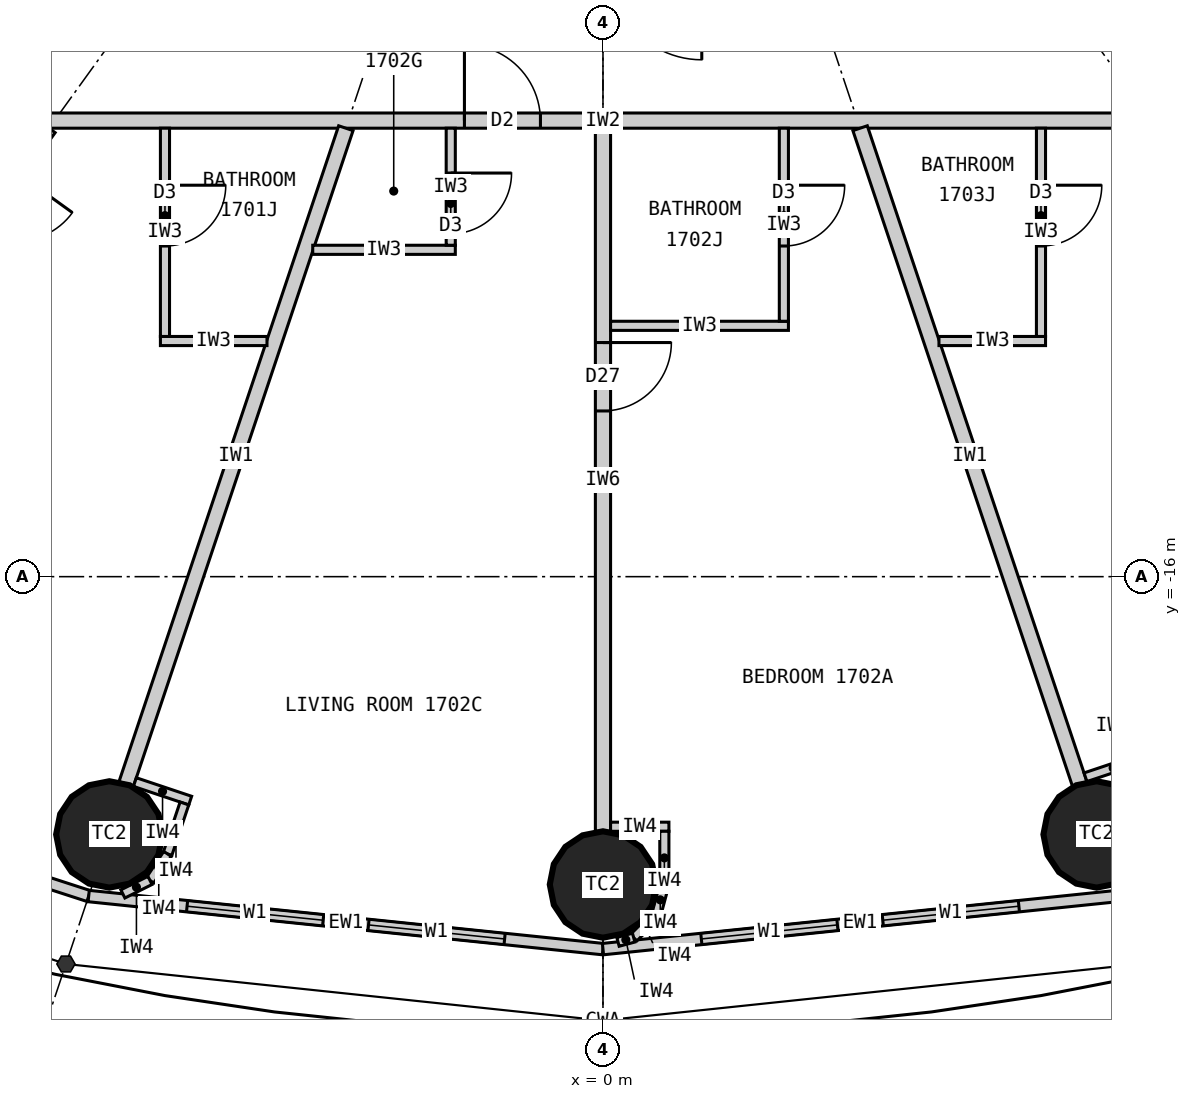
"""IFC4 building model, lengths in metres.
Left out: names, types, materials, properties, quantities, classifications, styles, units other than length and angle.
Written with IfcOpenShell. Run it as: python <this file> out.ifc"""

import sys

from ifc_helpers import new_model, si_unit, direction, frame, frame_2d, origin, origin_2d, place, context, subcontext, project, spatial, rectangle, circle, extrude, element, fill, save


model = new_model("IFC4")
c1 = context("Model", 3, precision=1e-05, world=origin(), true_north=direction((0.0, 1.0)))
c2 = subcontext(c1, "Body", "Model", "MODEL_VIEW")
j1 = project(units=[si_unit("LENGTHUNIT", "METRE"), si_unit("PLANEANGLEUNIT", "RADIAN")], contexts=[c1])
p1 = place(None, origin())
s1 = spatial("IfcSite", under=j1, at=p1, CompositionType="ELEMENT")
p2 = place(p1, origin())
s2 = spatial("IfcBuilding", under=s1, at=p2, CompositionType="ELEMENT")
p3 = place(p2, frame((0.0, 0.0, 70.5)))
s3 = spatial("IfcBuildingStorey", under=s2, at=p3, CompositionType="ELEMENT", Elevation=70.5)
for number, where, z_axis, x_axis in (
    (1, (-6.495, -19.391, 0.0), (0.0, 0.0, 1.0), (1.0, 0.0, 0.0)),
    (2, (0.0, -20.05, 0.0), (0.0, 0.0, 1.0), (1.0, 0.0, 0.0)),
    (3, (6.495, -19.391, 0.0), (0.0, 0.0, 1.0), (1.0, 0.0, 0.0)),
):
    element("IfcColumn", number, at=place(p3, frame(where, z_axis=z_axis, x_axis=x_axis)), inside=s3, PredefinedType="COLUMN", context=c2, shape_type="SweptSolid", body=[
        extrude(circle(Radius=0.7, at=origin_2d()), origin(), (0.0, 0.0, 1.0), 3.3),
    ])
p4 = place(p3, frame((-13.096, -18.147, 0.0), z_axis=(0.0, 0.0, 1.0), x_axis=(0.951137534625, -0.308767534285, 0.0)))
e4 = element("IfcWall", 4, at=p4, inside=s3, PredefinedType="ELEMENTEDWALL", context=c2, shape_type="SweptSolid", body=[
    extrude(rectangle(XDim=6.655, YDim=0.15, at=frame_2d((3.328, 0.0))), origin(), (0.0, 0.0, 1.0), 3.12),
])
p5 = place(p4, frame((1.228, 0.0, 0.9)))
e5 = element("IfcOpeningElement", 5, at=p5, cuts=e4, PredefinedType="OPENING", context=c2, shape_type="SweptSolid", body=[
    extrude(rectangle(XDim=1.8, YDim=1.9, at=frame_2d((0.9, 0.95))), frame((0.0, 0.085, 0.0), z_axis=(0.0, -1.0, 0.0), x_axis=(1.0, 0.0, 0.0)), (0.0, 0.0, 1.0), 0.17),
])
p6 = place(p4, frame((3.628, 0.0, 0.9)))
e6 = element("IfcOpeningElement", 6, at=p6, cuts=e4, PredefinedType="OPENING", context=c2, shape_type="SweptSolid", body=[
    extrude(rectangle(XDim=1.8, YDim=1.9, at=frame_2d((0.9, 0.95))), frame((0.0, 0.085, 0.0), z_axis=(0.0, -1.0, 0.0), x_axis=(1.0, 0.0, 0.0)), (0.0, 0.0, 1.0), 0.17),
])
p7 = place(p3, frame((-6.766, -20.202, 0.0), z_axis=(0.0, 0.0, 1.0), x_axis=(0.994721394369, -0.102612609291, 0.0)))
e7 = element("IfcWall", 7, at=p7, inside=s3, PredefinedType="ELEMENTEDWALL", context=c2, shape_type="SweptSolid", body=[
    extrude(rectangle(XDim=6.802, YDim=0.15, at=frame_2d((3.401, 0.0))), origin(), (0.0, 0.0, 1.0), 3.12),
])
p8 = place(p7, frame((1.301, 0.0, 0.9)))
e8 = element("IfcOpeningElement", 8, at=p8, cuts=e7, PredefinedType="OPENING", context=c2, shape_type="SweptSolid", body=[
    extrude(rectangle(XDim=1.8, YDim=1.9, at=frame_2d((0.9, 0.95))), frame((0.0, 0.085, 0.0), z_axis=(0.0, -1.0, 0.0), x_axis=(1.0, 0.0, 0.0)), (0.0, 0.0, 1.0), 0.17),
])
p9 = place(p7, frame((3.701, 0.0, 0.9)))
e9 = element("IfcOpeningElement", 9, at=p9, cuts=e7, PredefinedType="OPENING", context=c2, shape_type="SweptSolid", body=[
    extrude(rectangle(XDim=1.8, YDim=1.9, at=frame_2d((0.9, 0.95))), frame((0.0, 0.085, 0.0), z_axis=(0.0, -1.0, 0.0), x_axis=(1.0, 0.0, 0.0)), (0.0, 0.0, 1.0), 0.17),
])
p10 = place(p3, frame((0.0, -20.9, 0.0), z_axis=(0.0, 0.0, 1.0), x_axis=(0.994721394369, 0.102612609291, 0.0)))
e10 = element("IfcWall", 10, at=p10, inside=s3, PredefinedType="ELEMENTEDWALL", context=c2, shape_type="SweptSolid", body=[
    extrude(rectangle(XDim=6.802, YDim=0.15, at=frame_2d((3.401, 0.0))), origin(), (0.0, 0.0, 1.0), 3.12),
])
p11 = place(p10, frame((1.301, 0.0, 0.9)))
e11 = element("IfcOpeningElement", 11, at=p11, cuts=e10, PredefinedType="OPENING", context=c2, shape_type="SweptSolid", body=[
    extrude(rectangle(XDim=1.8, YDim=1.9, at=frame_2d((0.9, 0.95))), frame((0.0, 0.085, 0.0), z_axis=(0.0, -1.0, 0.0), x_axis=(1.0, 0.0, 0.0)), (0.0, 0.0, 1.0), 0.17),
])
p12 = place(p10, frame((3.701, 0.0, 0.9)))
e12 = element("IfcOpeningElement", 12, at=p12, cuts=e10, PredefinedType="OPENING", context=c2, shape_type="SweptSolid", body=[
    extrude(rectangle(XDim=1.8, YDim=1.9, at=frame_2d((0.9, 0.95))), frame((0.0, 0.085, 0.0), z_axis=(0.0, -1.0, 0.0), x_axis=(1.0, 0.0, 0.0)), (0.0, 0.0, 1.0), 0.17),
])
p13 = place(p3, frame((14.1, -10.0, 0.0), z_axis=(0.0, 0.0, 1.0), x_axis=(-1.0, 0.0, 0.0)))
e13 = element("IfcWall", 13, at=p13, inside=s3, PredefinedType="PARTITIONING", context=c2, shape_type="SweptSolid", body=[
    extrude(rectangle(XDim=28.2, YDim=0.2, at=frame_2d((14.1, 0.0))), origin(), (0.0, 0.0, 1.0), 3.12),
])
p14 = place(p13, frame((24.165, 0.0, 0.0)))
e14 = element("IfcOpeningElement", 14, at=p14, cuts=e13, PredefinedType="OPENING", context=c2, shape_type="SweptSolid", body=[
    extrude(rectangle(XDim=1.0, YDim=2.2, at=frame_2d((0.5, 1.1))), frame((0.0, 0.11, 0.0), z_axis=(0.0, -1.0, 0.0), x_axis=(1.0, 0.0, 0.0)), (0.0, 0.0, 1.0), 0.22),
])
p15 = place(p13, frame((14.923, 0.0, 0.0)))
e15 = element("IfcOpeningElement", 15, at=p15, cuts=e13, PredefinedType="OPENING", context=c2, shape_type="SweptSolid", body=[
    extrude(rectangle(XDim=1.0, YDim=2.2, at=frame_2d((0.5, 1.1))), frame((0.0, 0.11, 0.0), z_axis=(0.0, -1.0, 0.0), x_axis=(1.0, 0.0, 0.0)), (0.0, 0.0, 1.0), 0.22),
])
p16 = place(p13, frame((3.035, 0.0, 0.0)))
e16 = element("IfcOpeningElement", 16, at=p16, cuts=e13, PredefinedType="OPENING", context=c2, shape_type="SweptSolid", body=[
    extrude(rectangle(XDim=1.0, YDim=2.2, at=frame_2d((0.5, 1.1))), frame((0.0, 0.11, 0.0), z_axis=(0.0, -1.0, 0.0), x_axis=(1.0, 0.0, 0.0)), (0.0, 0.0, 1.0), 0.22),
])
p17 = place(p3, frame((-7.289, -10.1, 0.0), z_axis=(0.0, 0.0, 1.0), x_axis=(-0.585198353053, -0.810890182197, 0.0)))
e17 = element("IfcWall", 17, at=p17, inside=s3, PredefinedType="PARTITIONING", context=c2, shape_type="SweptSolid", body=[
    extrude(rectangle(XDim=8.36, YDim=0.2, at=frame_2d((4.18, 0.0))), origin(), (0.0, 0.0, 1.0), 2.32),
])
p18 = place(p17, frame((0.72, 0.0, 0.0)))
e18 = element("IfcOpeningElement", 18, at=p18, cuts=e17, PredefinedType="OPENING", context=c2, shape_type="SweptSolid", body=[
    extrude(rectangle(XDim=0.9, YDim=2.1, at=frame_2d((0.45, 1.05))), frame((0.0, 0.11, 0.0), z_axis=(0.0, -1.0, 0.0), x_axis=(1.0, 0.0, 0.0)), (0.0, 0.0, 1.0), 0.22),
])
p19 = place(p3, frame((-3.383, -10.1, 0.0), z_axis=(0.0, 0.0, 1.0), x_axis=(-0.31759592231, -0.948226149256, 0.0)))
e19 = element("IfcWall", 19, at=p19, inside=s3, PredefinedType="PARTITIONING", context=c2, shape_type="SweptSolid", body=[
    extrude(rectangle(XDim=9.098, YDim=0.2, at=frame_2d((4.549, 0.0))), origin(), (0.0, 0.0, 1.0), 2.32),
])
p20 = place(p3, frame((0.0, -10.1, 0.0), z_axis=(0.0, 0.0, 1.0), x_axis=(0.0, -1.0, 0.0)))
e20 = element("IfcWall", 20, at=p20, inside=s3, PredefinedType="PARTITIONING", context=c2, shape_type="SweptSolid", body=[
    extrude(rectangle(XDim=9.25, YDim=0.2, at=frame_2d((4.625, 0.0))), origin(), (0.0, 0.0, 1.0), 2.32),
])
p21 = place(p20, frame((2.82, 0.0, 0.0)))
e21 = element("IfcOpeningElement", 21, at=p21, cuts=e20, PredefinedType="OPENING", context=c2, shape_type="SweptSolid", body=[
    extrude(rectangle(XDim=0.9, YDim=2.1, at=frame_2d((0.45, 1.05))), frame((0.0, 0.11, 0.0), z_axis=(0.0, -1.0, 0.0), x_axis=(1.0, 0.0, 0.0)), (0.0, 0.0, 1.0), 0.22),
])
p22 = place(p3, frame((3.383, -10.1, 0.0), z_axis=(0.0, 0.0, 1.0), x_axis=(0.31759592231, -0.948226149256, 0.0)))
e22 = element("IfcWall", 22, at=p22, inside=s3, PredefinedType="PARTITIONING", context=c2, shape_type="SweptSolid", body=[
    extrude(rectangle(XDim=9.098, YDim=0.2, at=frame_2d((4.549, 0.0))), origin(), (0.0, 0.0, 1.0), 2.32),
])
p23 = place(p3, frame((-4.421, -12.9, 0.0), z_axis=(0.0, 0.0, 1.0), x_axis=(-1.0, 0.0, 0.0)))
e23 = element("IfcWall", 23, at=p23, inside=s3, PredefinedType="PARTITIONING", context=c2, shape_type="SweptSolid", body=[
    extrude(rectangle(XDim=1.402, YDim=0.12, at=frame_2d((0.701, 0.0))), origin(), (0.0, 0.0, 1.0), 3.12),
])
p24 = place(p3, frame((-5.763, -10.1, 0.0), z_axis=(0.0, 0.0, 1.0), x_axis=(0.0, -1.0, 0.0)))
e24 = element("IfcWall", 24, at=p24, inside=s3, PredefinedType="PARTITIONING", context=c2, shape_type="SweptSolid", body=[
    extrude(rectangle(XDim=2.74, YDim=0.12, at=frame_2d((1.37, 0.0))), origin(), (0.0, 0.0, 1.0), 3.12),
])
p25 = place(p24, frame((0.75, 0.0, 0.0)))
e25 = element("IfcOpeningElement", 25, at=p25, cuts=e24, PredefinedType="OPENING", context=c2, shape_type="SweptSolid", body=[
    extrude(rectangle(XDim=0.8, YDim=2.1, at=frame_2d((0.4, 1.05))), frame((0.0, 0.07, 0.0), z_axis=(0.0, -1.0, 0.0), x_axis=(1.0, 0.0, 0.0)), (0.0, 0.0, 1.0), 0.14),
])
p26 = place(p3, frame((-3.819, -11.7, 0.0), z_axis=(0.0, 0.0, 1.0), x_axis=(1.0, 0.0, 0.0)))
e26 = element("IfcWall", 26, at=p26, inside=s3, PredefinedType="PARTITIONING", context=c2, shape_type="SweptSolid", body=[
    extrude(rectangle(XDim=1.876, YDim=0.12, at=frame_2d((0.938, 0.0))), origin(), (0.0, 0.0, 1.0), 3.12),
])
p27 = place(p3, frame((-2.003, -10.1, 0.0), z_axis=(0.0, 0.0, 1.0), x_axis=(0.0, -1.0, 0.0)))
e27 = element("IfcWall", 27, at=p27, inside=s3, PredefinedType="PARTITIONING", context=c2, shape_type="SweptSolid", body=[
    extrude(rectangle(XDim=1.54, YDim=0.12, at=frame_2d((0.77, 0.0))), origin(), (0.0, 0.0, 1.0), 3.12),
])
p28 = place(p27, frame((0.59, 0.0, 0.0)))
e28 = element("IfcOpeningElement", 28, at=p28, cuts=e27, PredefinedType="OPENING", context=c2, shape_type="SweptSolid", body=[
    extrude(rectangle(XDim=0.8, YDim=2.1, at=frame_2d((0.4, 1.05))), frame((0.0, 0.07, 0.0), z_axis=(0.0, -1.0, 0.0), x_axis=(1.0, 0.0, 0.0)), (0.0, 0.0, 1.0), 0.14),
])
p29 = place(p3, frame((0.1, -12.7, 0.0), z_axis=(0.0, 0.0, 1.0), x_axis=(1.0, 0.0, 0.0)))
e29 = element("IfcWall", 29, at=p29, inside=s3, PredefinedType="PARTITIONING", context=c2, shape_type="SweptSolid", body=[
    extrude(rectangle(XDim=2.34, YDim=0.12, at=frame_2d((1.17, 0.0))), origin(), (0.0, 0.0, 1.0), 3.12),
])
p30 = place(p3, frame((2.38, -10.1, 0.0), z_axis=(0.0, 0.0, 1.0), x_axis=(0.0, -1.0, 0.0)))
e30 = element("IfcWall", 30, at=p30, inside=s3, PredefinedType="PARTITIONING", context=c2, shape_type="SweptSolid", body=[
    extrude(rectangle(XDim=2.54, YDim=0.12, at=frame_2d((1.27, 0.0))), origin(), (0.0, 0.0, 1.0), 3.12),
])
p31 = place(p30, frame((0.75, 0.0, 0.0)))
e31 = element("IfcOpeningElement", 31, at=p31, cuts=e30, PredefinedType="OPENING", context=c2, shape_type="SweptSolid", body=[
    extrude(rectangle(XDim=0.8, YDim=2.1, at=frame_2d((0.4, 1.05))), frame((0.0, 0.07, 0.0), z_axis=(0.0, -1.0, 0.0), x_axis=(1.0, 0.0, 0.0)), (0.0, 0.0, 1.0), 0.14),
])
p32 = place(p3, frame((4.421, -12.9, 0.0), z_axis=(0.0, 0.0, 1.0), x_axis=(1.0, 0.0, 0.0)))
e32 = element("IfcWall", 32, at=p32, inside=s3, PredefinedType="PARTITIONING", context=c2, shape_type="SweptSolid", body=[
    extrude(rectangle(XDim=1.402, YDim=0.12, at=frame_2d((0.701, 0.0))), origin(), (0.0, 0.0, 1.0), 3.12),
])
p33 = place(p3, frame((5.763, -10.1, 0.0), z_axis=(0.0, 0.0, 1.0), x_axis=(0.0, -1.0, 0.0)))
e33 = element("IfcWall", 33, at=p33, inside=s3, PredefinedType="PARTITIONING", context=c2, shape_type="SweptSolid", body=[
    extrude(rectangle(XDim=2.74, YDim=0.12, at=frame_2d((1.37, 0.0))), origin(), (0.0, 0.0, 1.0), 3.12),
])
p34 = place(p33, frame((0.75, 0.0, 0.0)))
e34 = element("IfcOpeningElement", 34, at=p34, cuts=e33, PredefinedType="OPENING", context=c2, shape_type="SweptSolid", body=[
    extrude(rectangle(XDim=0.8, YDim=2.1, at=frame_2d((0.4, 1.05))), frame((0.0, 0.07, 0.0), z_axis=(0.0, -1.0, 0.0), x_axis=(1.0, 0.0, 0.0)), (0.0, 0.0, 1.0), 0.14),
])
p35 = place(p3, frame((-6.159, -18.702, 0.0), z_axis=(0.0, 0.0, 1.0), x_axis=(0.948173154049, -0.31775410295, 0.0)))
e35 = element("IfcWall", 35, at=p35, inside=s3, PredefinedType="PARTITIONING", context=c2, shape_type="SweptSolid", body=[
    extrude(rectangle(XDim=0.768, YDim=0.12, at=frame_2d((0.384, 0.0))), origin(), (0.0, 0.0, 1.0), 3.12),
])
p36 = place(p3, frame((-5.507, -18.984, 0.0), z_axis=(0.0, 0.0, 1.0), x_axis=(-0.317692050622, -0.948193946918, 0.0)))
e36 = element("IfcWall", 36, at=p36, inside=s3, PredefinedType="PARTITIONING", context=c2, shape_type="SweptSolid", body=[
    extrude(rectangle(XDim=0.7, YDim=0.12, at=frame_2d((0.35, 0.0))), origin(), (0.0, 0.0, 1.0), 3.12),
])
p37 = place(p3, frame((-5.729, -19.648, 0.0), z_axis=(0.0, 0.0, 1.0), x_axis=(-0.552135764955, -0.833754218615, 0.0)))
e37 = element("IfcWall", 37, at=p37, inside=s3, PredefinedType="PARTITIONING", context=c2, shape_type="SweptSolid", body=[
    extrude(rectangle(XDim=0.418, YDim=0.12, at=frame_2d((0.209, 0.0))), origin(), (0.0, 0.0, 1.0), 3.12),
])
p38 = place(p3, frame((-5.96, -19.996, 0.0), z_axis=(0.0, 0.0, 1.0), x_axis=(-0.895160725913, -0.445743507842, 0.0)))
e38 = element("IfcWall", 38, at=p38, inside=s3, PredefinedType="PARTITIONING", context=c2, shape_type="SweptSolid", body=[
    extrude(rectangle(XDim=0.399, YDim=0.12, at=frame_2d((0.199, 0.0))), origin(), (0.0, 0.0, 1.0), 3.12),
])
p39 = place(p3, frame((0.1, -19.29, 0.0), z_axis=(0.0, 0.0, 1.0), x_axis=(1.0, 0.0, 0.0)))
e39 = element("IfcWall", 39, at=p39, inside=s3, PredefinedType="PARTITIONING", context=c2, shape_type="SweptSolid", body=[
    extrude(rectangle(XDim=0.767, YDim=0.12, at=frame_2d((0.384, 0.0))), origin(), (0.0, 0.0, 1.0), 3.12),
])
p40 = place(p3, frame((0.808, -19.35, 0.0), z_axis=(0.0, 0.0, 1.0), x_axis=(0.0, -1.0, 0.0)))
e40 = element("IfcWall", 40, at=p40, inside=s3, PredefinedType="PARTITIONING", context=c2, shape_type="SweptSolid", body=[
    extrude(rectangle(XDim=0.7, YDim=0.12, at=frame_2d((0.35, 0.0))), origin(), (0.0, 0.0, 1.0), 3.12),
])
p41 = place(p3, frame((0.808, -20.05, 0.0), z_axis=(0.0, 0.0, 1.0), x_axis=(-0.2592614205, -0.965807183573, 0.0)))
e41 = element("IfcWall", 41, at=p41, inside=s3, PredefinedType="PARTITIONING", context=c2, shape_type="SweptSolid", body=[
    extrude(rectangle(XDim=0.418, YDim=0.12, at=frame_2d((0.209, 0.0))), origin(), (0.0, 0.0, 1.0), 3.12),
])
p42 = place(p3, frame((0.699, -20.454, 0.0), z_axis=(0.0, 0.0, 1.0), x_axis=(-0.707106781187, -0.707106781187, 0.0)))
e42 = element("IfcWall", 42, at=p42, inside=s3, PredefinedType="PARTITIONING", context=c2, shape_type="SweptSolid", body=[
    extrude(rectangle(XDim=0.418, YDim=0.12, at=frame_2d((0.209, 0.0))), origin(), (0.0, 0.0, 1.0), 3.12),
])
p43 = place(p3, frame((0.404, -20.749, 0.0), z_axis=(0.0, 0.0, 1.0), x_axis=(-0.965759066438, -0.25944060128, 0.0)))
e43 = element("IfcWall", 43, at=p43, inside=s3, PredefinedType="PARTITIONING", context=c2, shape_type="SweptSolid", body=[
    extrude(rectangle(XDim=0.214, YDim=0.12, at=frame_2d((0.107, 0.0))), origin(), (0.0, 0.0, 1.0), 3.12),
])
p44 = place(p3, frame((6.348, -18.639, 0.0), z_axis=(0.0, 0.0, 1.0), x_axis=(0.948268951266, 0.317468102437, 0.0)))
e44 = element("IfcWall", 44, at=p44, inside=s3, PredefinedType="PARTITIONING", context=c2, shape_type="SweptSolid", body=[
    extrude(rectangle(XDim=0.768, YDim=0.12, at=frame_2d((0.384, 0.0))), origin(), (0.0, 0.0, 1.0), 3.12),
])
p45 = place(p8, origin())
e45 = element("IfcWindow", 45, at=p45, inside=s3, PartitioningType="SINGLE_PANEL", PredefinedType="WINDOW", context=c2, shape_type="SweptSolid", body=[
    extrude(rectangle(XDim=1.8, YDim=1.9, at=frame_2d((0.9, 0.95))), frame((0.0, 0.03, 0.0), z_axis=(0.0, -1.0, 0.0), x_axis=(1.0, 0.0, 0.0)), (0.0, 0.0, 1.0), 0.06),
])
fill(e8, e45)
p46 = place(p9, origin())
e46 = element("IfcWindow", 46, at=p46, inside=s3, PartitioningType="SINGLE_PANEL", PredefinedType="WINDOW", context=c2, shape_type="SweptSolid", body=[
    extrude(rectangle(XDim=1.8, YDim=1.9, at=frame_2d((0.9, 0.95))), frame((0.0, 0.03, 0.0), z_axis=(0.0, -1.0, 0.0), x_axis=(1.0, 0.0, 0.0)), (0.0, 0.0, 1.0), 0.06),
])
fill(e9, e46)
p47 = place(p11, origin())
e47 = element("IfcWindow", 47, at=p47, inside=s3, PartitioningType="SINGLE_PANEL", PredefinedType="WINDOW", context=c2, shape_type="SweptSolid", body=[
    extrude(rectangle(XDim=1.8, YDim=1.9, at=frame_2d((0.9, 0.95))), frame((0.0, 0.03, 0.0), z_axis=(0.0, -1.0, 0.0), x_axis=(1.0, 0.0, 0.0)), (0.0, 0.0, 1.0), 0.06),
])
fill(e11, e47)
p48 = place(p12, origin())
e48 = element("IfcWindow", 48, at=p48, inside=s3, PartitioningType="SINGLE_PANEL", PredefinedType="WINDOW", context=c2, shape_type="SweptSolid", body=[
    extrude(rectangle(XDim=1.8, YDim=1.9, at=frame_2d((0.9, 0.95))), frame((0.0, 0.03, 0.0), z_axis=(0.0, -1.0, 0.0), x_axis=(1.0, 0.0, 0.0)), (0.0, 0.0, 1.0), 0.06),
])
fill(e12, e48)
p49 = place(p25, origin())
e49 = element("IfcDoor", 49, at=p49, inside=s3, OperationType="SINGLE_SWING_LEFT", PredefinedType="DOOR", context=c2, shape_type="SweptSolid", body=[
    extrude(rectangle(XDim=0.8, YDim=2.1, at=frame_2d((0.4, 1.05))), frame((0.0, 0.025, 0.0), z_axis=(0.0, -1.0, 0.0), x_axis=(1.0, 0.0, 0.0)), (0.0, 0.0, 1.0), 0.05),
])
fill(e25, e49)
p50 = place(p28, origin())
e50 = element("IfcDoor", 50, at=p50, inside=s3, OperationType="SINGLE_SWING_LEFT", PredefinedType="DOOR", context=c2, shape_type="SweptSolid", body=[
    extrude(rectangle(XDim=0.8, YDim=2.1, at=frame_2d((0.4, 1.05))), frame((0.0, 0.025, 0.0), z_axis=(0.0, -1.0, 0.0), x_axis=(1.0, 0.0, 0.0)), (0.0, 0.0, 1.0), 0.05),
])
fill(e28, e50)
p51 = place(p15, origin())
e51 = element("IfcDoor", 51, at=p51, inside=s3, OperationType="SINGLE_SWING_RIGHT", PredefinedType="DOOR", context=c2, shape_type="SweptSolid", body=[
    extrude(rectangle(XDim=1.0, YDim=2.2, at=frame_2d((0.5, 1.1))), frame((0.0, 0.025, 0.0), z_axis=(0.0, -1.0, 0.0), x_axis=(1.0, 0.0, 0.0)), (0.0, 0.0, 1.0), 0.05),
])
fill(e15, e51)
p52 = place(p31, origin())
e52 = element("IfcDoor", 52, at=p52, inside=s3, OperationType="SINGLE_SWING_LEFT", PredefinedType="DOOR", context=c2, shape_type="SweptSolid", body=[
    extrude(rectangle(XDim=0.8, YDim=2.1, at=frame_2d((0.4, 1.05))), frame((0.0, 0.025, 0.0), z_axis=(0.0, -1.0, 0.0), x_axis=(1.0, 0.0, 0.0)), (0.0, 0.0, 1.0), 0.05),
])
fill(e31, e52)
p53 = place(p21, origin())
e53 = element("IfcDoor", 53, at=p53, inside=s3, OperationType="SINGLE_SWING_LEFT", PredefinedType="DOOR", context=c2, shape_type="SweptSolid", body=[
    extrude(rectangle(XDim=0.9, YDim=2.1, at=frame_2d((0.45, 1.05))), frame((0.0, 0.025, 0.0), z_axis=(0.0, -1.0, 0.0), x_axis=(1.0, 0.0, 0.0)), (0.0, 0.0, 1.0), 0.05),
])
fill(e21, e53)
p54 = place(p34, origin())
e54 = element("IfcDoor", 54, at=p54, inside=s3, OperationType="SINGLE_SWING_LEFT", PredefinedType="DOOR", context=c2, shape_type="SweptSolid", body=[
    extrude(rectangle(XDim=0.8, YDim=2.1, at=frame_2d((0.4, 1.05))), frame((0.0, 0.025, 0.0), z_axis=(0.0, -1.0, 0.0), x_axis=(1.0, 0.0, 0.0)), (0.0, 0.0, 1.0), 0.05),
])
fill(e34, e54)
save(model, sys.argv[1])
